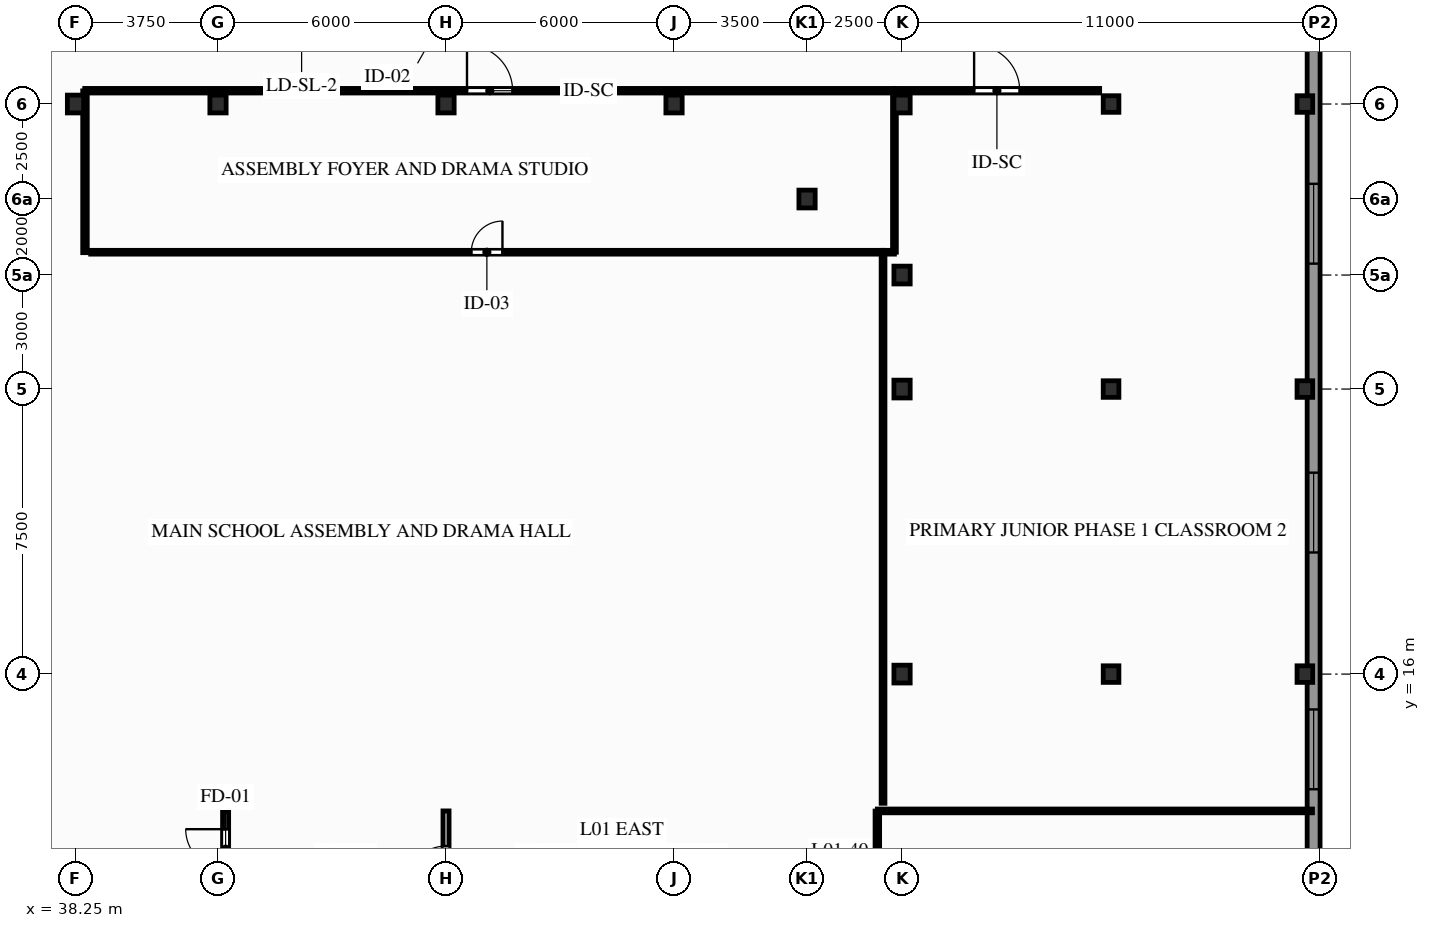
"""IFC4 building model, lengths in metres.
Left out: names, types, materials, properties, quantities, classifications, styles, units other than length and angle.
Written with IfcOpenShell. Run it as: python <this file> out.ifc"""

import sys

from ifc_helpers import new_model, si_unit, direction, frame, frame_2d, origin, origin_2d, place, context, subcontext, project, spatial, rectangle, i_section, extrude, element, fill, save


model = new_model("IFC4")
c1 = context("Model", 3, precision=1e-05, world=origin(), true_north=direction((0.0, 1.0)))
c2 = subcontext(c1, "Body", "Model", "MODEL_VIEW")
j1 = project(units=[si_unit("LENGTHUNIT", "METRE"), si_unit("PLANEANGLEUNIT", "RADIAN")], contexts=[c1])
p1 = place(None, origin())
s1 = spatial("IfcSite", under=j1, at=p1, CompositionType="ELEMENT")
p2 = place(p1, origin())
s2 = spatial("IfcBuilding", under=s1, at=p2, CompositionType="ELEMENT")
p3 = place(p2, frame((0.0, 0.0, 4.5)))
s3 = spatial("IfcBuildingStorey", under=s2, at=p3, CompositionType="ELEMENT", Elevation=4.5)
for number, where, z_axis, x_axis in (
    (1, (38.25, 31.0, 0.0), (0.0, 0.0, 1.0), (1.0, 0.0, 0.0)),
    (2, (42.0, 31.0, 0.0), (0.0, 0.0, 1.0), (1.0, 0.0, 0.0)),
    (3, (48.0, 31.0, 0.0), (0.0, 0.0, 1.0), (1.0, 0.0, 0.0)),
    (4, (54.0, 31.0, 0.0), (0.0, 0.0, 1.0), (1.0, 0.0, 0.0)),
    (5, (57.5, 28.5, 0.0), (0.0, 0.0, 1.0), (1.0, 0.0, 0.0)),
    (6, (60.0, 16.0, 0.0), (0.0, 0.0, 1.0), (1.0, 0.0, 0.0)),
    (7, (60.0, 23.5, 0.0), (0.0, 0.0, 1.0), (1.0, 0.0, 0.0)),
    (8, (60.0, 26.5, 0.0), (0.0, 0.0, 1.0), (1.0, 0.0, 0.0)),
    (9, (60.0, 31.0, 0.0), (0.0, 0.0, 1.0), (1.0, 0.0, 0.0)),
):
    element("IfcColumn", number, at=place(p3, frame(where, z_axis=z_axis, x_axis=x_axis)), inside=s3, PredefinedType="COLUMN", context=c2, shape_type="SweptSolid", body=[
        extrude(i_section(OverallWidth=0.428, OverallDepth=0.469, WebThickness=0.078, FlangeThickness=0.125, FilletRadius=0.015, at=origin_2d()), origin(), (0.0, 0.0, 1.0), 4.5),
    ])
for number, where, z_axis, x_axis in (
    (10, (65.5, 16.0, 0.0), (0.0, 0.0, 1.0), (1.0, 0.0, 0.0)),
    (11, (65.5, 23.5, 0.0), (0.0, 0.0, 1.0), (1.0, 0.0, 0.0)),
    (12, (65.5, 31.0, 0.0), (0.0, 0.0, 1.0), (1.0, 0.0, 0.0)),
    (13, (70.6, 16.0, 0.0), (0.0, 0.0, 1.0), (1.0, 0.0, 0.0)),
    (14, (70.6, 23.5, 0.0), (0.0, 0.0, 1.0), (1.0, 0.0, 0.0)),
    (15, (70.6, 31.0, 0.0), (0.0, 0.0, 1.0), (1.0, 0.0, 0.0)),
):
    element("IfcColumn", number, at=place(p3, frame(where, z_axis=z_axis, x_axis=x_axis)), inside=s3, PredefinedType="COLUMN", context=c2, shape_type="SweptSolid", body=[
        extrude(i_section(OverallWidth=0.412, OverallDepth=0.437, WebThickness=0.036, FlangeThickness=0.058, FilletRadius=0.015, at=origin_2d()), origin(), (0.0, 0.0, 1.0), 4.5),
    ])
p4 = place(p3, frame((70.83, -1.83, 0.0), z_axis=(0.0, 0.0, 1.0), x_axis=(0.0, 1.0, 0.0)))
e16 = element("IfcWall", 16, at=p4, inside=s3, PredefinedType="STANDARD", context=c2, shape_type="SweptSolid", body=[
    extrude(rectangle(XDim=36.43, YDim=0.34, at=frame_2d((18.215, 0.0))), origin(), (0.0, 0.0, 1.0), 3.583),
])
p5 = place(p4, frame((6.33, 0.0, 0.9)))
e17 = element("IfcOpeningElement", 17, at=p5, cuts=e16, PredefinedType="OPENING", context=c2, shape_type="SweptSolid", body=[
    extrude(rectangle(XDim=2.1, YDim=2.05, at=frame_2d((1.05, 1.025))), frame((0.0, 0.18, 0.0), z_axis=(0.0, -1.0, 0.0), x_axis=(1.0, 0.0, 0.0)), (0.0, 0.0, 1.0), 0.36),
])
p6 = place(p4, frame((14.8, 0.0, 0.9)))
e18 = element("IfcOpeningElement", 18, at=p6, cuts=e16, PredefinedType="OPENING", context=c2, shape_type="SweptSolid", body=[
    extrude(rectangle(XDim=2.1, YDim=2.05, at=frame_2d((1.05, 1.025))), frame((0.0, 0.18, 0.0), z_axis=(0.0, -1.0, 0.0), x_axis=(1.0, 0.0, 0.0)), (0.0, 0.0, 1.0), 0.36),
])
p7 = place(p4, frame((21.03, 0.0, 0.9)))
e19 = element("IfcOpeningElement", 19, at=p7, cuts=e16, PredefinedType="OPENING", context=c2, shape_type="SweptSolid", body=[
    extrude(rectangle(XDim=2.1, YDim=2.05, at=frame_2d((1.05, 1.025))), frame((0.0, 0.18, 0.0), z_axis=(0.0, -1.0, 0.0), x_axis=(1.0, 0.0, 0.0)), (0.0, 0.0, 1.0), 0.36),
])
p8 = place(p4, frame((28.63, 0.0, 0.9)))
e20 = element("IfcOpeningElement", 20, at=p8, cuts=e16, PredefinedType="OPENING", context=c2, shape_type="SweptSolid", body=[
    extrude(rectangle(XDim=2.1, YDim=2.05, at=frame_2d((1.05, 1.025))), frame((0.0, 0.18, 0.0), z_axis=(0.0, -1.0, 0.0), x_axis=(1.0, 0.0, 0.0)), (0.0, 0.0, 1.0), 0.36),
])
p9 = place(p3, frame((42.2, 10.389, 0.0), z_axis=(0.0, 0.0, 1.0), x_axis=(0.0, 1.0, 0.0)))
e21 = element("IfcWall", 21, at=p9, inside=s3, PredefinedType="PARTITIONING", context=c2, shape_type="SweptSolid", body=[
    extrude(rectangle(XDim=2.011, YDim=0.16, at=frame_2d((1.006, 0.0))), origin(), (0.0, 0.0, 1.0), 4.22),
])
p10 = place(p9, frame((0.481, 0.0, 0.0)))
e22 = element("IfcOpeningElement", 22, at=p10, cuts=e21, PredefinedType="OPENING", context=c2, shape_type="SweptSolid", body=[
    extrude(rectangle(XDim=1.05, YDim=2.06, at=frame_2d((0.525, 1.03))), frame((0.0, 0.09, 0.0), z_axis=(0.0, -1.0, 0.0), x_axis=(1.0, 0.0, 0.0)), (0.0, 0.0, 1.0), 0.18),
])
p11 = place(p3, frame((48.0, 9.5, 0.0), z_axis=(0.0, 0.0, 1.0), x_axis=(0.0, 1.0, 0.0)))
e23 = element("IfcWall", 23, at=p11, inside=s3, PredefinedType="PARTITIONING", context=c2, shape_type="SweptSolid", body=[
    extrude(rectangle(XDim=2.9, YDim=0.16, at=frame_2d((1.45, 0.0))), origin(), (0.0, 0.0, 1.0), 3.268),
])
p12 = place(p11, frame((0.925, 0.0, 0.0)))
e24 = element("IfcOpeningElement", 24, at=p12, cuts=e23, PredefinedType="OPENING", context=c2, shape_type="SweptSolid", body=[
    extrude(rectangle(XDim=1.05, YDim=2.06, at=frame_2d((0.525, 1.03))), frame((0.0, 0.09, 0.0), z_axis=(0.0, -1.0, 0.0), x_axis=(1.0, 0.0, 0.0)), (0.0, 0.0, 1.0), 0.18),
])
p13 = place(p3, frame((38.493, 31.35, 0.0), z_axis=(0.0, 0.0, 1.0), x_axis=(1.0, 0.0, 0.0)))
e25 = element("IfcWall", 25, at=p13, inside=s3, PredefinedType="PARTITIONING", context=c2, shape_type="SweptSolid", body=[
    extrude(rectangle(XDim=21.319, YDim=0.12, at=frame_2d((10.659, 0.0))), origin(), (0.0, 0.0, 1.0), 3.268),
])
p14 = place(p13, frame((10.059, 0.0, 0.0)))
e26 = element("IfcOpeningElement", 26, at=p14, cuts=e25, PredefinedType="OPENING", context=c2, shape_type="SweptSolid", body=[
    extrude(rectangle(XDim=1.2, YDim=2.08, at=frame_2d((0.6, 1.04))), frame((0.0, 0.07, 0.0), z_axis=(0.0, -1.0, 0.0), x_axis=(1.0, 0.0, 0.0)), (0.0, 0.0, 1.0), 0.14),
])
p15 = place(p3, frame((59.793, 31.35, 0.0), z_axis=(0.0, 0.0, 1.0), x_axis=(1.0, 0.0, 0.0)))
e27 = element("IfcWall", 27, at=p15, inside=s3, PredefinedType="PARTITIONING", context=c2, shape_type="SweptSolid", body=[
    extrude(rectangle(XDim=5.407, YDim=0.12, at=frame_2d((2.704, 0.0))), origin(), (0.0, 0.0, 1.0), 4.22),
])
p16 = place(p15, frame((2.104, 0.0, 0.0)))
e28 = element("IfcOpeningElement", 28, at=p16, cuts=e27, PredefinedType="OPENING", context=c2, shape_type="SweptSolid", body=[
    extrude(rectangle(XDim=1.2, YDim=2.08, at=frame_2d((0.6, 1.04))), frame((0.0, 0.07, 0.0), z_axis=(0.0, -1.0, 0.0), x_axis=(1.0, 0.0, 0.0)), (0.0, 0.0, 1.0), 0.14),
])
p17 = place(p3, frame((38.5, 27.089, 0.0), z_axis=(0.0, 0.0, 1.0), x_axis=(0.0, 1.0, 0.0)))
e29 = element("IfcWall", 29, at=p17, inside=s3, PredefinedType="PARTITIONING", context=c2, shape_type="SweptSolid", body=[
    extrude(rectangle(XDim=4.257, YDim=0.12, at=frame_2d((2.129, 0.0))), origin(), (0.0, 0.0, 1.0), 3.268),
])
p18 = place(p3, frame((38.65, 27.1, 0.0), z_axis=(0.0, 0.0, 1.0), x_axis=(1.0, 0.0, 0.0)))
e30 = element("IfcWall", 30, at=p18, inside=s3, PredefinedType="PARTITIONING", context=c2, shape_type="SweptSolid", body=[
    extrude(rectangle(XDim=20.85, YDim=0.1, at=frame_2d((10.425, 0.0))), origin(), (0.0, 0.0, 1.0), 4.22),
])
p19 = place(p18, frame((10.015, 0.0, 0.0)))
e31 = element("IfcOpeningElement", 31, at=p19, cuts=e30, PredefinedType="OPENING", context=c2, shape_type="SweptSolid", body=[
    extrude(rectangle(XDim=0.82, YDim=2.02, at=frame_2d((0.41, 1.01))), frame((0.0, 0.06, 0.0), z_axis=(0.0, -1.0, 0.0), x_axis=(1.0, 0.0, 0.0)), (0.0, 0.0, 1.0), 0.12),
])
p20 = place(p3, frame((59.5, 12.6, 0.0), z_axis=(0.0, 0.0, 1.0), x_axis=(0.0, 1.0, 0.0)))
e32 = element("IfcWall", 32, at=p20, inside=s3, PredefinedType="PARTITIONING", context=c2, shape_type="SweptSolid", body=[
    extrude(rectangle(XDim=14.5, YDim=0.1, at=frame_2d((7.25, 0.0))), origin(), (0.0, 0.0, 1.0), 4.22),
])
p21 = place(p3, frame((59.504, 27.1, 0.0), z_axis=(0.0, 0.0, 1.0), x_axis=(1.0, 0.0, 0.0)))
e33 = element("IfcWall", 33, at=p21, inside=s3, PredefinedType="PARTITIONING", context=c2, shape_type="SweptSolid", body=[
    extrude(rectangle(XDim=0.296, YDim=0.1, at=frame_2d((0.148, 0.0))), origin(), (0.0, 0.0, 1.0), 4.22),
])
p22 = place(p3, frame((59.8, 27.1, 0.0), z_axis=(0.0, 0.0, 1.0), x_axis=(0.0, 1.0, 0.0)))
e34 = element("IfcWall", 34, at=p22, inside=s3, PredefinedType="PARTITIONING", context=c2, shape_type="SweptSolid", body=[
    extrude(rectangle(XDim=4.246, YDim=0.1, at=frame_2d((2.123, 0.0))), origin(), (0.0, 0.0, 1.0), 3.583),
])
p23 = place(p3, frame((59.35, 12.4, 0.0), z_axis=(0.0, 0.0, 1.0), x_axis=(1.0, 0.0, 0.0)))
e35 = element("IfcWall", 35, at=p23, inside=s3, PredefinedType="PARTITIONING", context=c2, shape_type="SweptSolid", body=[
    extrude(rectangle(XDim=11.45, YDim=0.1, at=frame_2d((5.725, 0.0))), origin(), (0.0, 0.0, 1.0), 3.268),
])
p24 = place(p3, frame((59.35, 7.204, 0.0), z_axis=(0.0, 0.0, 1.0), x_axis=(0.0, 1.0, 0.0)))
e36 = element("IfcWall", 36, at=p24, inside=s3, PredefinedType="PARTITIONING", context=c2, shape_type="SweptSolid", body=[
    extrude(rectangle(XDim=5.192, YDim=0.12, at=frame_2d((2.596, 0.0))), origin(), (0.0, 0.0, 1.0), 3.268),
])
p25 = place(p24, frame((1.461, 0.0, 0.0)))
e37 = element("IfcOpeningElement", 37, at=p25, cuts=e36, PredefinedType="OPENING", context=c2, shape_type="SweptSolid", body=[
    extrude(rectangle(XDim=0.95, YDim=2.05, at=frame_2d((0.475, 1.025))), frame((0.0, 0.07, 0.0), z_axis=(0.0, -1.0, 0.0), x_axis=(1.0, 0.0, 0.0)), (0.0, 0.0, 1.0), 0.14),
])
p26 = place(p6, origin())
e38 = element("IfcWindow", 38, at=p26, inside=s3, PartitioningType="SINGLE_PANEL", PredefinedType="WINDOW", context=c2, shape_type="SweptSolid", body=[
    extrude(rectangle(XDim=2.1, YDim=2.05, at=frame_2d((1.05, 1.025))), frame((0.0, 0.03, 0.0), z_axis=(0.0, -1.0, 0.0), x_axis=(1.0, 0.0, 0.0)), (0.0, 0.0, 1.0), 0.06),
])
fill(e18, e38)
p27 = place(p7, origin())
e39 = element("IfcWindow", 39, at=p27, inside=s3, PartitioningType="SINGLE_PANEL", PredefinedType="WINDOW", context=c2, shape_type="SweptSolid", body=[
    extrude(rectangle(XDim=2.1, YDim=2.05, at=frame_2d((1.05, 1.025))), frame((0.0, 0.03, 0.0), z_axis=(0.0, -1.0, 0.0), x_axis=(1.0, 0.0, 0.0)), (0.0, 0.0, 1.0), 0.06),
])
fill(e19, e39)
p28 = place(p8, origin())
e40 = element("IfcWindow", 40, at=p28, inside=s3, PartitioningType="SINGLE_PANEL", PredefinedType="WINDOW", context=c2, shape_type="SweptSolid", body=[
    extrude(rectangle(XDim=2.1, YDim=2.05, at=frame_2d((1.05, 1.025))), frame((0.0, 0.03, 0.0), z_axis=(0.0, -1.0, 0.0), x_axis=(1.0, 0.0, 0.0)), (0.0, 0.0, 1.0), 0.06),
])
fill(e20, e40)
p29 = place(p10, origin())
e41 = element("IfcDoor", 41, at=p29, inside=s3, OperationType="SINGLE_SWING_RIGHT", PredefinedType="DOOR", context=c2, shape_type="SweptSolid", body=[
    extrude(rectangle(XDim=1.05, YDim=2.06, at=frame_2d((0.525, 1.03))), frame((0.0, 0.025, 0.0), z_axis=(0.0, -1.0, 0.0), x_axis=(1.0, 0.0, 0.0)), (0.0, 0.0, 1.0), 0.05),
])
fill(e22, e41)
p30 = place(p12, origin())
e42 = element("IfcDoor", 42, at=p30, inside=s3, OperationType="SINGLE_SWING_LEFT", PredefinedType="DOOR", context=c2, shape_type="SweptSolid", body=[
    extrude(rectangle(XDim=1.05, YDim=2.06, at=frame_2d((0.525, 1.03))), frame((0.0, 0.025, 0.0), z_axis=(0.0, -1.0, 0.0), x_axis=(1.0, 0.0, 0.0)), (0.0, 0.0, 1.0), 0.05),
])
fill(e24, e42)
p31 = place(p14, origin())
e43 = element("IfcDoor", 43, at=p31, inside=s3, OperationType="SINGLE_SWING_LEFT", PredefinedType="DOOR", context=c2, shape_type="SweptSolid", body=[
    extrude(rectangle(XDim=1.2, YDim=2.08, at=frame_2d((0.6, 1.04))), frame((0.0, 0.025, 0.0), z_axis=(0.0, -1.0, 0.0), x_axis=(1.0, 0.0, 0.0)), (0.0, 0.0, 1.0), 0.05),
])
fill(e26, e43)
p32 = place(p16, origin())
e44 = element("IfcDoor", 44, at=p32, inside=s3, OperationType="SINGLE_SWING_LEFT", PredefinedType="DOOR", context=c2, shape_type="SweptSolid", body=[
    extrude(rectangle(XDim=1.2, YDim=2.08, at=frame_2d((0.6, 1.04))), frame((0.0, 0.025, 0.0), z_axis=(0.0, -1.0, 0.0), x_axis=(1.0, 0.0, 0.0)), (0.0, 0.0, 1.0), 0.05),
])
fill(e28, e44)
p33 = place(p19, origin())
e45 = element("IfcDoor", 45, at=p33, inside=s3, OperationType="SINGLE_SWING_RIGHT", PredefinedType="DOOR", context=c2, shape_type="SweptSolid", body=[
    extrude(rectangle(XDim=0.82, YDim=2.02, at=frame_2d((0.41, 1.01))), frame((0.0, 0.025, 0.0), z_axis=(0.0, -1.0, 0.0), x_axis=(1.0, 0.0, 0.0)), (0.0, 0.0, 1.0), 0.05),
])
fill(e31, e45)
save(model, sys.argv[1])
